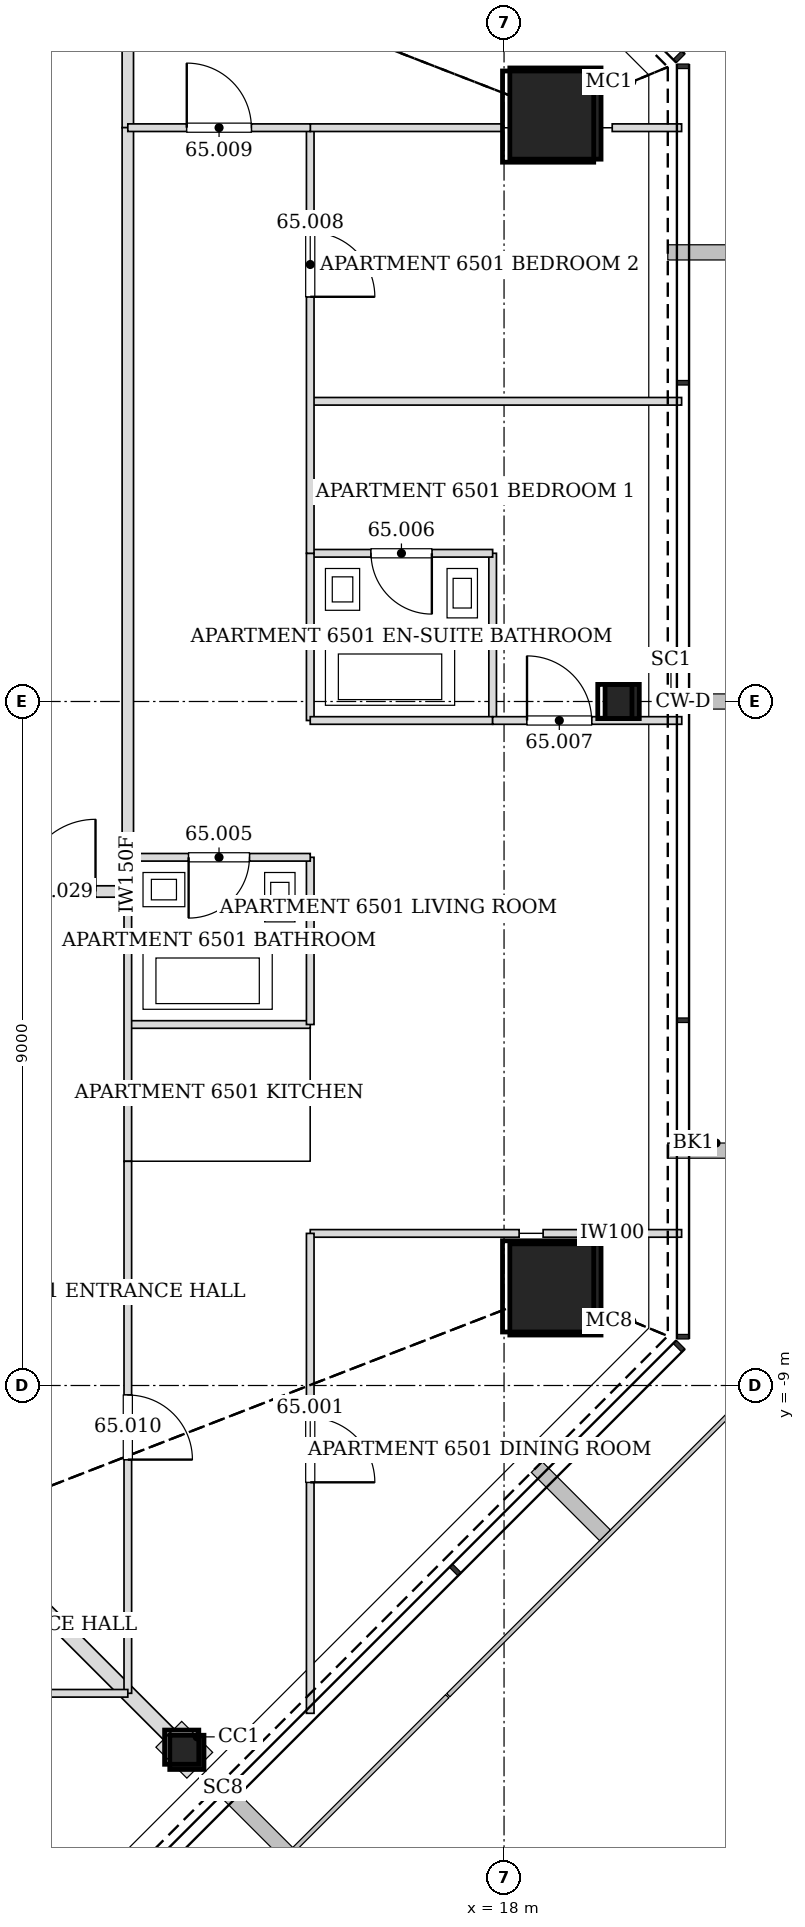
"""IFC4 building model, lengths in metres.
Left out: names, types, materials, properties, quantities, classifications, styles, units other than length and angle.
Written with IfcOpenShell. Run it as: python <this file> out.ifc"""

import sys

from ifc_helpers import new_model, si_unit, direction, frame, frame_2d, origin, origin_2d, place, context, subcontext, project, spatial, rectangle, hollow_rectangle, extrude, element, fill, save


model = new_model("IFC4")
c1 = context("Model", 3, precision=1e-05, world=origin(), true_north=direction((0.0, 1.0)))
c2 = subcontext(c1, "Body", "Model", "MODEL_VIEW")
j1 = project(units=[si_unit("LENGTHUNIT", "METRE"), si_unit("PLANEANGLEUNIT", "RADIAN")], contexts=[c1])
p1 = place(None, origin())
s1 = spatial("IfcSite", under=j1, at=p1, CompositionType="ELEMENT")
p2 = place(p1, origin())
s2 = spatial("IfcBuilding", under=s1, at=p2, CompositionType="ELEMENT")
p3 = place(p2, frame((0.0, 0.0, 270.8)))
s3 = spatial("IfcBuildingStorey", under=s2, at=p3, CompositionType="ELEMENT", Elevation=270.8)
for number, where, z_axis, x_axis in (
    (1, (18.676, 7.736, 0.0), (-0.028, -0.012, 1.0), (0.382, -0.924, 0.0)),
    (2, (18.676, -7.736, 0.0), (-0.028, 0.012, 1.0), (-0.382, -0.924, 0.0)),
):
    element("IfcColumn", number, at=place(p3, frame(where, z_axis=z_axis, x_axis=x_axis)), inside=s3, PredefinedType="COLUMN", context=c2, shape_type="SweptSolid", body=[
        extrude(hollow_rectangle(XDim=1.2, YDim=1.2, WallThickness=0.055, at=origin_2d()), origin(), (0.0, 0.0, 1.0), 3.402),
    ])
for number, where, z_axis, x_axis in (
    (3, (19.554, 0.0, 0.0), (-0.028, 0.0, 1.0), (0.0, -1.0, 0.0)),
    (4, (13.827, -13.827, 0.0), (-0.02, 0.02, 1.0), (-0.707, -0.707, 0.0)),
):
    element("IfcColumn", number, at=place(p3, frame(where, z_axis=z_axis, x_axis=x_axis)), inside=s3, PredefinedType="COLUMN", context=c2, shape_type="SweptSolid", body=[
        extrude(hollow_rectangle(XDim=0.45, YDim=0.45, WallThickness=0.02, at=origin_2d()), origin(), (0.0, 0.0, 1.0), 3.401),
    ])
p4 = place(p3, frame((13.05, -2.5, 0.0), z_axis=(0.0, 0.0, 1.0), x_axis=(0.0, 1.0, 0.0)))
e5 = element("IfcWall", 5, at=p4, inside=s3, PredefinedType="PARTITIONING", context=c2, shape_type="SweptSolid", body=[
    extrude(rectangle(XDim=0.451, YDim=0.15, at=frame_2d((0.226, 0.0))), origin(), (0.0, 0.0, 1.0), 3.2),
])
p5 = place(p3, frame((13.05, 7.549, 0.0), z_axis=(0.0, 0.0, 1.0), x_axis=(0.0, 1.0, 0.0)))
e6 = element("IfcWall", 6, at=p5, inside=s3, PredefinedType="PARTITIONING", context=c2, shape_type="SweptSolid", body=[
    extrude(rectangle(XDim=5.501, YDim=0.15, at=frame_2d((2.75, 0.0))), origin(), (0.0, 0.0, 1.0), 2.349),
])
p6 = place(p3, frame((13.05, -2.051, 0.0), z_axis=(0.0, 0.0, 1.0), x_axis=(0.0, 1.0, 0.0)))
e7 = element("IfcWall", 7, at=p6, inside=s3, PredefinedType="PARTITIONING", context=c2, shape_type="SweptSolid", body=[
    extrude(rectangle(XDim=9.602, YDim=0.15, at=frame_2d((4.801, 0.0))), origin(), (0.0, 0.0, 1.0), 2.344),
])
p7 = place(p3, frame((11.25, -2.5, 0.0), z_axis=(0.0, 0.0, 1.0), x_axis=(1.0, 0.0, 0.0)))
e8 = element("IfcWall", 8, at=p7, inside=s3, PredefinedType="PARTITIONING", context=c2, shape_type="SweptSolid", body=[
    extrude(rectangle(XDim=1.8, YDim=0.15, at=frame_2d((0.9, 0.0))), origin(), (0.0, 0.0, 1.0), 3.2),
])
p8 = place(p7, frame((0.425, 0.0, 0.0)))
e9 = element("IfcOpeningElement", 9, at=p8, cuts=e8, PredefinedType="OPENING", context=c2, shape_type="SweptSolid", body=[
    extrude(rectangle(XDim=0.95, YDim=2.1, at=frame_2d((0.475, 1.05))), frame((0.0, 0.085, 0.0), z_axis=(0.0, -1.0, 0.0), x_axis=(1.0, 0.0, 0.0)), (0.0, 0.0, 1.0), 0.17),
])
p9 = place(p3, frame((20.336, -6.999, 0.0), z_axis=(0.0, 0.0, 1.0), x_axis=(-1.0, 0.0, 0.0)))
e10 = element("IfcWall", 10, at=p9, inside=s3, PredefinedType="PARTITIONING", context=c2, shape_type="SweptSolid", body=[
    extrude(rectangle(XDim=1.822, YDim=0.1, at=frame_2d((0.911, 0.0))), origin(), (0.0, 0.0, 1.0), 2.74),
])
p10 = place(p3, frame((18.198, -6.999, 0.0), z_axis=(0.0, 0.0, 1.0), x_axis=(-1.0, 0.0, 0.0)))
e11 = element("IfcWall", 11, at=p10, inside=s3, PredefinedType="PARTITIONING", context=c2, shape_type="SweptSolid", body=[
    extrude(rectangle(XDim=2.748, YDim=0.1, at=frame_2d((1.374, 0.0))), origin(), (0.0, 0.0, 1.0), 2.591),
])
p11 = place(p3, frame((15.45, -6.999, 0.0), z_axis=(0.0, 0.0, 1.0), x_axis=(0.0, -1.0, 0.0)))
e12 = element("IfcWall", 12, at=p11, inside=s3, PredefinedType="PARTITIONING", context=c2, shape_type="SweptSolid", body=[
    extrude(rectangle(XDim=6.314, YDim=0.1, at=frame_2d((3.157, 0.0))), origin(), (0.0, 0.0, 1.0), 2.349),
])
p12 = place(p11, frame((2.425, 0.0, 0.0)))
e13 = element("IfcOpeningElement", 13, at=p12, cuts=e12, PredefinedType="OPENING", context=c2, shape_type="SweptSolid", body=[
    extrude(rectangle(XDim=0.85, YDim=2.1, at=frame_2d((0.425, 1.05))), frame((0.0, 0.06, 0.0), z_axis=(0.0, -1.0, 0.0), x_axis=(1.0, 0.0, 0.0)), (0.0, 0.0, 1.0), 0.12),
])
p13 = place(p3, frame((15.45, -4.25, 0.0), z_axis=(0.0, 0.0, 1.0), x_axis=(-1.0, 0.0, 0.0)))
e14 = element("IfcWall", 14, at=p13, inside=s3, PredefinedType="PARTITIONING", context=c2, shape_type="SweptSolid", body=[
    extrude(rectangle(XDim=2.4, YDim=0.1, at=frame_2d((1.2, 0.0))), origin(), (0.0, 0.0, 1.0), 2.591),
])
p14 = place(p3, frame((13.05, -6.05, 0.0), z_axis=(0.0, 0.0, 1.0), x_axis=(0.0, 1.0, 0.0)))
e15 = element("IfcWall", 15, at=p14, inside=s3, PredefinedType="PARTITIONING", context=c2, shape_type="SweptSolid", body=[
    extrude(rectangle(XDim=3.551, YDim=0.1, at=frame_2d((1.775, 0.0))), origin(), (0.0, 0.0, 1.0), 3.2),
])
p15 = place(p3, frame((15.45, -4.25, 0.0), z_axis=(0.0, 0.0, 1.0), x_axis=(0.0, 1.0, 0.0)))
e16 = element("IfcWall", 16, at=p15, inside=s3, PredefinedType="PARTITIONING", context=c2, shape_type="SweptSolid", body=[
    extrude(rectangle(XDim=2.2, YDim=0.1, at=frame_2d((1.1, 0.0))), origin(), (0.0, 0.0, 1.0), 3.2),
])
p16 = place(p3, frame((15.45, -2.05, 0.0), z_axis=(0.0, 0.0, 1.0), x_axis=(-1.0, 0.0, 0.0)))
e17 = element("IfcWall", 17, at=p16, inside=s3, PredefinedType="PARTITIONING", context=c2, shape_type="SweptSolid", body=[
    extrude(rectangle(XDim=2.4, YDim=0.1, at=frame_2d((1.2, 0.0))), origin(), (0.0, 0.0, 1.0), 2.591),
])
p17 = place(p16, frame((0.8, 0.0, 0.0)))
e18 = element("IfcOpeningElement", 18, at=p17, cuts=e17, PredefinedType="OPENING", context=c2, shape_type="SweptSolid", body=[
    extrude(rectangle(XDim=0.8, YDim=2.1, at=frame_2d((0.4, 1.05))), frame((0.0, 0.06, 0.0), z_axis=(0.0, -1.0, 0.0), x_axis=(1.0, 0.0, 0.0)), (0.0, 0.0, 1.0), 0.12),
])
p18 = place(p3, frame((17.85, -0.25, 0.0), z_axis=(0.0, 0.0, 1.0), x_axis=(0.0, 1.0, 0.0)))
e19 = element("IfcWall", 19, at=p18, inside=s3, PredefinedType="PARTITIONING", context=c2, shape_type="SweptSolid", body=[
    extrude(rectangle(XDim=2.2, YDim=0.1, at=frame_2d((1.1, 0.0))), origin(), (0.0, 0.0, 1.0), 2.344),
])
p19 = place(p3, frame((17.85, 1.95, 0.0), z_axis=(0.0, 0.0, 1.0), x_axis=(-1.0, 0.0, 0.0)))
e20 = element("IfcWall", 20, at=p19, inside=s3, PredefinedType="PARTITIONING", context=c2, shape_type="SweptSolid", body=[
    extrude(rectangle(XDim=2.4, YDim=0.1, at=frame_2d((1.2, 0.0))), origin(), (0.0, 0.0, 1.0), 2.591),
])
p20 = place(p19, frame((0.8, 0.0, 0.0)))
e21 = element("IfcOpeningElement", 21, at=p20, cuts=e20, PredefinedType="OPENING", context=c2, shape_type="SweptSolid", body=[
    extrude(rectangle(XDim=0.8, YDim=2.1, at=frame_2d((0.4, 1.05))), frame((0.0, 0.06, 0.0), z_axis=(0.0, -1.0, 0.0), x_axis=(1.0, 0.0, 0.0)), (0.0, 0.0, 1.0), 0.12),
])
p21 = place(p3, frame((15.45, 1.95, 0.0), z_axis=(0.0, 0.0, 1.0), x_axis=(0.0, -1.0, 0.0)))
e22 = element("IfcWall", 22, at=p21, inside=s3, PredefinedType="PARTITIONING", context=c2, shape_type="SweptSolid", body=[
    extrude(rectangle(XDim=2.2, YDim=0.1, at=frame_2d((1.1, 0.0))), origin(), (0.0, 0.0, 1.0), 2.344),
])
p22 = place(p3, frame((15.45, -0.25, 0.0), z_axis=(0.0, 0.0, 1.0), x_axis=(1.0, 0.0, 0.0)))
e23 = element("IfcWall", 23, at=p22, inside=s3, PredefinedType="PARTITIONING", context=c2, shape_type="SweptSolid", body=[
    extrude(rectangle(XDim=2.4, YDim=0.1, at=frame_2d((1.2, 0.0))), origin(), (0.0, 0.0, 1.0), 2.591),
])
p23 = place(p3, frame((20.336, 3.95, 0.0), z_axis=(0.0, 0.0, 1.0), x_axis=(-1.0, 0.0, 0.0)))
e24 = element("IfcWall", 24, at=p23, inside=s3, PredefinedType="PARTITIONING", context=c2, shape_type="SweptSolid", body=[
    extrude(rectangle(XDim=4.886, YDim=0.1, at=frame_2d((2.443, 0.0))), origin(), (0.0, 0.0, 1.0), 2.591),
])
p24 = place(p3, frame((15.45, 1.95, 0.0), z_axis=(0.0, 0.0, 1.0), x_axis=(0.0, 1.0, 0.0)))
e25 = element("IfcWall", 25, at=p24, inside=s3, PredefinedType="PARTITIONING", context=c2, shape_type="SweptSolid", body=[
    extrude(rectangle(XDim=5.6, YDim=0.1, at=frame_2d((2.8, 0.0))), origin(), (0.0, 0.0, 1.0), 3.2),
])
p25 = place(p24, frame((3.375, 0.0, 0.0)))
e26 = element("IfcOpeningElement", 26, at=p25, cuts=e25, PredefinedType="OPENING", context=c2, shape_type="SweptSolid", body=[
    extrude(rectangle(XDim=0.85, YDim=2.1, at=frame_2d((0.425, 1.05))), frame((0.0, 0.06, 0.0), z_axis=(0.0, -1.0, 0.0), x_axis=(1.0, 0.0, 0.0)), (0.0, 0.0, 1.0), 0.12),
])
p26 = place(p3, frame((17.85, -0.25, 0.0), z_axis=(0.0, 0.0, 1.0), x_axis=(1.0, 0.0, 0.0)))
e27 = element("IfcWall", 27, at=p26, inside=s3, PredefinedType="PARTITIONING", context=c2, shape_type="SweptSolid", body=[
    extrude(rectangle(XDim=2.488, YDim=0.1, at=frame_2d((1.244, 0.0))), origin(), (0.0, 0.0, 1.0), 2.74),
])
p27 = place(p26, frame((0.452, 0.0, 0.0)))
e28 = element("IfcOpeningElement", 28, at=p27, cuts=e27, PredefinedType="OPENING", context=c2, shape_type="SweptSolid", body=[
    extrude(rectangle(XDim=0.85, YDim=2.1, at=frame_2d((0.425, 1.05))), frame((0.0, 0.06, 0.0), z_axis=(0.0, -1.0, 0.0), x_axis=(1.0, 0.0, 0.0)), (0.0, 0.0, 1.0), 0.12),
])
p28 = place(p3, frame((20.336, 7.55, 0.0), z_axis=(0.0, 0.0, 1.0), x_axis=(-1.0, 0.0, 0.0)))
e29 = element("IfcWall", 29, at=p28, inside=s3, PredefinedType="PARTITIONING", context=c2, shape_type="SweptSolid", body=[
    extrude(rectangle(XDim=0.913, YDim=0.1, at=frame_2d((0.457, 0.0))), origin(), (0.0, 0.0, 1.0), 3.2),
])
p29 = place(p3, frame((17.97, 7.55, 0.0), z_axis=(0.0, 0.0, 1.0), x_axis=(-1.0, 0.0, 0.0)))
e30 = element("IfcWall", 30, at=p29, inside=s3, PredefinedType="PARTITIONING", context=c2, shape_type="SweptSolid", body=[
    extrude(rectangle(XDim=2.52, YDim=0.1, at=frame_2d((1.26, 0.0))), origin(), (0.0, 0.0, 1.0), 2.591),
])
p30 = place(p3, frame((13.05, 7.55, 0.0), z_axis=(0.0, 0.0, 1.0), x_axis=(1.0, 0.0, 0.0)))
e31 = element("IfcWall", 31, at=p30, inside=s3, PredefinedType="PARTITIONING", context=c2, shape_type="SweptSolid", body=[
    extrude(rectangle(XDim=2.401, YDim=0.1, at=frame_2d((1.2, 0.0))), origin(), (0.0, 0.0, 1.0), 2.591),
])
p31 = place(p30, frame((0.775, 0.0, 0.0)))
e32 = element("IfcOpeningElement", 32, at=p31, cuts=e31, PredefinedType="OPENING", context=c2, shape_type="SweptSolid", body=[
    extrude(rectangle(XDim=0.85, YDim=2.1, at=frame_2d((0.425, 1.05))), frame((0.0, 0.06, 0.0), z_axis=(0.0, -1.0, 0.0), x_axis=(1.0, 0.0, 0.0)), (0.0, 0.0, 1.0), 0.12),
])
p32 = place(p3, frame((13.586, -13.586, 0.0), z_axis=(0.0, 0.0, 1.0), x_axis=(-0.707106781187, 0.707106781187, 0.0)))
e33 = element("IfcWall", 33, at=p32, inside=s3, PredefinedType="PARTITIONING", context=c2, shape_type="SweptSolid", body=[
    extrude(rectangle(XDim=3.277, YDim=0.2, at=frame_2d((1.638, 0.0))), origin(), (0.0, 0.0, 1.0), 2.591),
])
p33 = place(p3, frame((13.05, -6.05, 0.0), z_axis=(0.0, 0.0, 1.0), x_axis=(0.0, -1.0, 0.0)))
e34 = element("IfcWall", 34, at=p33, inside=s3, PredefinedType="PARTITIONING", context=c2, shape_type="SweptSolid", body=[
    extrude(rectangle(XDim=7.0, YDim=0.1, at=frame_2d((3.5, 0.0))), origin(), (0.0, 0.0, 1.0), 2.349),
])
p34 = place(p33, frame((3.075, 0.0, 0.0)))
e35 = element("IfcOpeningElement", 35, at=p34, cuts=e34, PredefinedType="OPENING", context=c2, shape_type="SweptSolid", body=[
    extrude(rectangle(XDim=0.85, YDim=2.1, at=frame_2d((0.425, 1.05))), frame((0.0, 0.06, 0.0), z_axis=(0.0, -1.0, 0.0), x_axis=(1.0, 0.0, 0.0)), (0.0, 0.0, 1.0), 0.12),
])
p35 = place(p3, frame((13.05, -13.05, 0.0), z_axis=(0.0, 0.0, 1.0), x_axis=(-1.0, 0.0, 0.0)))
e36 = element("IfcWall", 36, at=p35, inside=s3, PredefinedType="PARTITIONING", context=c2, shape_type="SweptSolid", body=[
    extrude(rectangle(XDim=4.651, YDim=0.1, at=frame_2d((2.326, 0.0))), origin(), (0.0, 0.0, 1.0), 2.349),
])
p36 = place(p35, frame((1.9, 0.0, 0.0)))
e37 = element("IfcOpeningElement", 37, at=p36, cuts=e36, PredefinedType="OPENING", context=c2, shape_type="SweptSolid", body=[
    extrude(rectangle(XDim=0.85, YDim=2.1, at=frame_2d((0.425, 1.05))), frame((0.0, 0.06, 0.0), z_axis=(0.0, -1.0, 0.0), x_axis=(1.0, 0.0, 0.0)), (0.0, 0.0, 1.0), 0.12),
])
p37 = place(p12, origin())
e38 = element("IfcDoor", 38, at=p37, inside=s3, OperationType="SINGLE_SWING_RIGHT", PredefinedType="DOOR", context=c2, shape_type="SweptSolid", body=[
    extrude(rectangle(XDim=0.85, YDim=2.1, at=frame_2d((0.425, 1.05))), frame((0.0, 0.025, 0.0), z_axis=(0.0, -1.0, 0.0), x_axis=(1.0, 0.0, 0.0)), (0.0, 0.0, 1.0), 0.05),
])
fill(e13, e38)
p38 = place(p17, origin())
e39 = element("IfcDoor", 39, at=p38, inside=s3, OperationType="SINGLE_SWING_RIGHT", PredefinedType="DOOR", context=c2, shape_type="SweptSolid", body=[
    extrude(rectangle(XDim=0.8, YDim=2.1, at=frame_2d((0.4, 1.05))), frame((0.0, 0.025, 0.0), z_axis=(0.0, -1.0, 0.0), x_axis=(1.0, 0.0, 0.0)), (0.0, 0.0, 1.0), 0.05),
])
fill(e18, e39)
p39 = place(p20, origin())
e40 = element("IfcDoor", 40, at=p39, inside=s3, OperationType="SINGLE_SWING_LEFT", PredefinedType="DOOR", context=c2, shape_type="SweptSolid", body=[
    extrude(rectangle(XDim=0.8, YDim=2.1, at=frame_2d((0.4, 1.05))), frame((0.0, 0.025, 0.0), z_axis=(0.0, -1.0, 0.0), x_axis=(1.0, 0.0, 0.0)), (0.0, 0.0, 1.0), 0.05),
])
fill(e21, e40)
p40 = place(p27, origin())
e41 = element("IfcDoor", 41, at=p40, inside=s3, OperationType="SINGLE_SWING_LEFT", PredefinedType="DOOR", context=c2, shape_type="SweptSolid", body=[
    extrude(rectangle(XDim=0.85, YDim=2.1, at=frame_2d((0.425, 1.05))), frame((0.0, 0.025, 0.0), z_axis=(0.0, -1.0, 0.0), x_axis=(1.0, 0.0, 0.0)), (0.0, 0.0, 1.0), 0.05),
])
fill(e28, e41)
p41 = place(p25, frame((0.85, 0.0, 0.0), z_axis=(0.0, 0.0, 1.0), x_axis=(-1.0, 0.0, 0.0)))
e42 = element("IfcDoor", 42, at=p41, inside=s3, OperationType="SINGLE_SWING_RIGHT", PredefinedType="DOOR", context=c2, shape_type="SweptSolid", body=[
    extrude(rectangle(XDim=0.85, YDim=2.1, at=frame_2d((0.425, 1.05))), frame((0.0, 0.025, 0.0), z_axis=(0.0, -1.0, 0.0), x_axis=(1.0, 0.0, 0.0)), (0.0, 0.0, 1.0), 0.05),
])
fill(e26, e42)
p42 = place(p31, origin())
e43 = element("IfcDoor", 43, at=p42, inside=s3, OperationType="SINGLE_SWING_LEFT", PredefinedType="DOOR", context=c2, shape_type="SweptSolid", body=[
    extrude(rectangle(XDim=0.85, YDim=2.1, at=frame_2d((0.425, 1.05))), frame((0.0, 0.025, 0.0), z_axis=(0.0, -1.0, 0.0), x_axis=(1.0, 0.0, 0.0)), (0.0, 0.0, 1.0), 0.05),
])
fill(e32, e43)
p43 = place(p34, origin())
e44 = element("IfcDoor", 44, at=p43, inside=s3, OperationType="SINGLE_SWING_RIGHT", PredefinedType="DOOR", context=c2, shape_type="SweptSolid", body=[
    extrude(rectangle(XDim=0.85, YDim=2.1, at=frame_2d((0.425, 1.05))), frame((0.0, 0.025, 0.0), z_axis=(0.0, -1.0, 0.0), x_axis=(1.0, 0.0, 0.0)), (0.0, 0.0, 1.0), 0.05),
])
fill(e35, e44)
p44 = place(p8, origin())
e45 = element("IfcDoor", 45, at=p44, inside=s3, OperationType="SINGLE_SWING_RIGHT", PredefinedType="DOOR", context=c2, shape_type="SweptSolid", body=[
    extrude(rectangle(XDim=0.95, YDim=2.1, at=frame_2d((0.475, 1.05))), frame((0.0, 0.025, 0.0), z_axis=(0.0, -1.0, 0.0), x_axis=(1.0, 0.0, 0.0)), (0.0, 0.0, 1.0), 0.05),
])
fill(e9, e45)
save(model, sys.argv[1])
